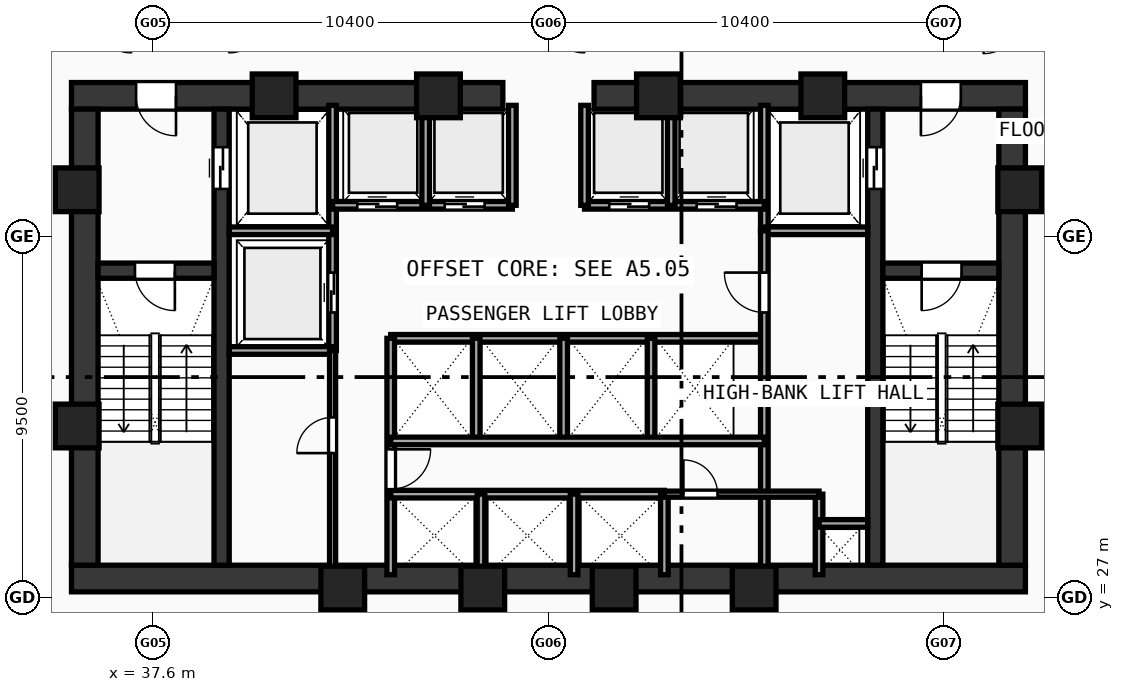
"""IFC4 building model, lengths in metres.
Left out: names, types, materials, properties, quantities, classifications, styles, units other than length and angle.
Written with IfcOpenShell. Run it as: python <this file> out.ifc"""

import sys

from ifc_helpers import new_model, si_unit, direction, frame, frame_2d, origin, origin_with_axes, origin_2d, place, context, subcontext, project, spatial, rectangle, hollow_rectangle, extrude, source, transform, mapped, element, fill, save


model = new_model("IFC4")
c1 = context("Model", 3, precision=1e-05, world=origin(), true_north=direction((0.0, 1.0)))
c2 = subcontext(c1, "Body", "Model", "MODEL_VIEW")
j1 = project(units=[si_unit("LENGTHUNIT", "METRE"), si_unit("PLANEANGLEUNIT", "RADIAN")], contexts=[c1])
p1 = place(None, origin())
s1 = spatial("IfcSite", under=j1, at=p1, CompositionType="ELEMENT")
p2 = place(p1, origin())
s2 = spatial("IfcBuilding", under=s1, at=p2, CompositionType="ELEMENT")
p3 = place(p2, frame((0.0, 0.0, 34.03)))
s3 = spatial("IfcBuildingStorey", under=s2, at=p3, CompositionType="ELEMENT", Elevation=34.03)
p4 = place(p3, frame((35.45, 27.5, 0.0), z_axis=(0.0, 0.0, 1.0), x_axis=(1.0, 0.0, 0.0)))
e1 = element("IfcWall", 1, at=p4, inside=s3, PredefinedType="SHEAR", context=c2, shape_type="SweptSolid", body=[
    extrude(rectangle(XDim=25.1, YDim=0.7, at=frame_2d((12.55, 0.0))), origin(), (0.0, 0.0, 1.0), 3.37),
])
p5 = place(p3, frame((35.45, 40.2, 0.0), z_axis=(0.0, 0.0, 1.0), x_axis=(1.0, 0.0, 0.0)))
e2 = element("IfcWall", 2, at=p5, inside=s3, PredefinedType="SHEAR", context=c2, shape_type="SweptSolid", body=[
    extrude(rectangle(XDim=11.35, YDim=0.7, at=frame_2d((5.675, 0.0))), origin(), (0.0, 0.0, 1.0), 3.37),
])
p6 = place(p5, frame((1.7, 0.0, 0.0)))
e3 = element("IfcOpeningElement", 3, at=p6, cuts=e2, PredefinedType="OPENING", context=c2, shape_type="SweptSolid", body=[
    extrude(rectangle(XDim=1.05, YDim=2.1, at=frame_2d((0.525, 1.05))), frame((0.0, 0.36, 0.0), z_axis=(0.0, -1.0, 0.0), x_axis=(1.0, 0.0, 0.0)), (0.0, 0.0, 1.0), 0.72),
])
p7 = place(p3, frame((49.2, 40.2, 0.0), z_axis=(0.0, 0.0, 1.0), x_axis=(1.0, 0.0, 0.0)))
e4 = element("IfcWall", 4, at=p7, inside=s3, PredefinedType="SHEAR", context=c2, shape_type="SweptSolid", body=[
    extrude(rectangle(XDim=11.35, YDim=0.7, at=frame_2d((5.675, 0.0))), origin(), (0.0, 0.0, 1.0), 3.37),
])
p8 = place(p7, frame((8.6, 0.0, 0.0)))
e5 = element("IfcOpeningElement", 5, at=p8, cuts=e4, PredefinedType="OPENING", context=c2, shape_type="SweptSolid", body=[
    extrude(rectangle(XDim=1.05, YDim=2.1, at=frame_2d((0.525, 1.05))), frame((0.0, 0.36, 0.0), z_axis=(0.0, -1.0, 0.0), x_axis=(1.0, 0.0, 0.0)), (0.0, 0.0, 1.0), 0.72),
])
for number, where, z_axis, x_axis in (
    (6, (35.8, 27.85, 0.0), (0.0, 0.0, 1.0), (0.0, 1.0, 0.0)),
    (7, (60.2, 27.85, 0.0), (0.0, 0.0, 1.0), (0.0, 1.0, 0.0)),
):
    element("IfcWall", number, at=place(p3, frame(where, z_axis=z_axis, x_axis=x_axis)), inside=s3, PredefinedType="SHEAR", context=c2, shape_type="SweptSolid", body=[
        extrude(rectangle(XDim=12.0, YDim=0.7, at=frame_2d((6.0, 0.0))), origin(), (0.0, 0.0, 1.0), 3.37),
    ])
p9 = place(p3, frame((39.4, 27.85, 0.0), z_axis=(0.0, 0.0, 1.0), x_axis=(0.0, 1.0, 0.0)))
e8 = element("IfcWall", 8, at=p9, inside=s3, PredefinedType="SHEAR", context=c2, shape_type="SweptSolid", body=[
    extrude(rectangle(XDim=12.0, YDim=0.4, at=frame_2d((6.0, 0.0))), origin(), (0.0, 0.0, 1.0), 3.37),
])
p10 = place(p9, frame((9.9, 0.0, 0.0)))
e9 = element("IfcOpeningElement", 9, at=p10, cuts=e8, PredefinedType="OPENING", context=c2, shape_type="SweptSolid", body=[
    extrude(rectangle(XDim=1.1, YDim=2.1, at=frame_2d((0.55, 1.05))), frame((0.0, 0.21, 0.0), z_axis=(0.0, -1.0, 0.0), x_axis=(1.0, 0.0, 0.0)), (0.0, 0.0, 1.0), 0.42),
])
p11 = place(p3, frame((56.6, 27.85, 0.0), z_axis=(0.0, 0.0, 1.0), x_axis=(0.0, 1.0, 0.0)))
e10 = element("IfcWall", 10, at=p11, inside=s3, PredefinedType="SHEAR", context=c2, shape_type="SweptSolid", body=[
    extrude(rectangle(XDim=12.0, YDim=0.4, at=frame_2d((6.0, 0.0))), origin(), (0.0, 0.0, 1.0), 3.37),
])
p12 = place(p11, frame((9.9, 0.0, 0.0)))
e11 = element("IfcOpeningElement", 11, at=p12, cuts=e10, PredefinedType="OPENING", context=c2, shape_type="SweptSolid", body=[
    extrude(rectangle(XDim=1.1, YDim=2.1, at=frame_2d((0.55, 1.05))), frame((0.0, 0.21, 0.0), z_axis=(0.0, -1.0, 0.0), x_axis=(1.0, 0.0, 0.0)), (0.0, 0.0, 1.0), 0.42),
])
p13 = place(p3, frame((36.15, 35.6, 0.0), z_axis=(0.0, 0.0, 1.0), x_axis=(1.0, 0.0, 0.0)))
e12 = element("IfcWall", 12, at=p13, inside=s3, PredefinedType="SHEAR", context=c2, shape_type="SweptSolid", body=[
    extrude(rectangle(XDim=3.05, YDim=0.4, at=frame_2d((1.525, 0.0))), origin(), (0.0, 0.0, 1.0), 3.37),
])
p14 = place(p13, frame((0.97, 0.0, 0.0)))
e13 = element("IfcOpeningElement", 13, at=p14, cuts=e12, PredefinedType="OPENING", context=c2, shape_type="SweptSolid", body=[
    extrude(rectangle(XDim=1.05, YDim=2.1, at=frame_2d((0.525, 1.05))), frame((0.0, 0.21, 0.0), z_axis=(0.0, -1.0, 0.0), x_axis=(1.0, 0.0, 0.0)), (0.0, 0.0, 1.0), 0.42),
])
p15 = place(p3, frame((56.8, 35.6, 0.0), z_axis=(0.0, 0.0, 1.0), x_axis=(1.0, 0.0, 0.0)))
e14 = element("IfcWall", 14, at=p15, inside=s3, PredefinedType="SHEAR", context=c2, shape_type="SweptSolid", body=[
    extrude(rectangle(XDim=3.05, YDim=0.4, at=frame_2d((1.525, 0.0))), origin(), (0.0, 0.0, 1.0), 3.37),
])
p16 = place(p15, frame((1.02, 0.0, 0.0)))
e15 = element("IfcOpeningElement", 15, at=p16, cuts=e14, PredefinedType="OPENING", context=c2, shape_type="SweptSolid", body=[
    extrude(rectangle(XDim=1.05, YDim=2.1, at=frame_2d((0.525, 1.05))), frame((0.0, 0.21, 0.0), z_axis=(0.0, -1.0, 0.0), x_axis=(1.0, 0.0, 0.0)), (0.0, 0.0, 1.0), 0.42),
])
m1 = source(origin(), c2, "Body", "SweptSolid", [
    extrude(hollow_rectangle(XDim=1.15, YDim=1.15, WallThickness=0.048, at=origin_2d()), origin(), (0.0, 0.0, 1.0), 3.63),
])
for number, where, z_axis, x_axis in (
    (16, (42.588, 27.25, -0.26), (0.0, 0.0, 1.0), (1.0, 0.0, 0.0)),
    (17, (46.272, 27.25, -0.26), (0.0, 0.0, 1.0), (1.0, 0.0, 0.0)),
    (18, (49.729, 27.25, -0.26), (0.0, 0.0, 1.0), (1.0, 0.0, 0.0)),
    (19, (53.412, 27.25, -0.26), (0.0, 0.0, 1.0), (1.0, 0.0, 0.0)),
    (20, (60.4, 31.513, -0.26), (0.0, 0.0, 1.0), (1.0, 0.0, 0.0)),
    (21, (60.4, 37.729, -0.26), (0.0, 0.0, 1.0), (1.0, 0.0, 0.0)),
    (22, (55.219, 40.2, -0.26), (0.0, 0.0, 1.0), (1.0, 0.0, 0.0)),
    (23, (50.894, 40.2, -0.26), (0.0, 0.0, 1.0), (1.0, 0.0, 0.0)),
    (24, (45.106, 40.2, -0.26), (0.0, 0.0, 1.0), (1.0, 0.0, 0.0)),
    (25, (40.781, 40.2, -0.26), (0.0, 0.0, 1.0), (1.0, 0.0, 0.0)),
    (26, (35.6, 37.729, -0.26), (0.0, 0.0, 1.0), (1.0, 0.0, 0.0)),
    (27, (35.6, 31.513, -0.26), (0.0, 0.0, 1.0), (1.0, 0.0, 0.0)),
):
    element("IfcColumn", number, at=place(p3, frame(where, z_axis=z_axis, x_axis=x_axis)), inside=s3, PredefinedType="COLUMN", context=c2, shape_type="MappedRepresentation", body=[
        mapped(m1, transform((0.0, 0.0, 0.0), scale=1.0)),
    ])
p17 = place(p3, frame((42.32, 33.5, 0.0), z_axis=(0.0, 0.0, 1.0), x_axis=(0.0, 1.0, 0.0)))
e28 = element("IfcWall", 28, at=p17, inside=s3, PredefinedType="SOLIDWALL", context=c2, shape_type="SweptSolid", body=[
    extrude(rectangle(XDim=6.45, YDim=0.2, at=frame_2d((3.225, 0.0))), origin(), (0.0, 0.0, 1.0), 3.37),
])
p18 = place(p17, frame((1.0, 0.0, 0.0)))
e29 = element("IfcOpeningElement", 29, at=p18, cuts=e28, PredefinedType="OPENING", context=c2, shape_type="SweptSolid", body=[
    extrude(rectangle(XDim=1.05, YDim=2.1, at=frame_2d((0.525, 1.05))), frame((0.0, 0.11, 0.0), z_axis=(0.0, -1.0, 0.0), x_axis=(1.0, 0.0, 0.0)), (0.0, 0.0, 1.0), 0.22),
])
for number, where, z_axis, x_axis in (
    (30, (39.6, 36.65, 0.0), (0.0, 0.0, 1.0), (1.0, 0.0, 0.0)),
    (31, (39.6, 33.5, 0.0), (0.0, 0.0, 1.0), (1.0, 0.0, 0.0)),
):
    element("IfcWall", number, at=place(p3, frame(where, z_axis=z_axis, x_axis=x_axis)), inside=s3, PredefinedType="SOLIDWALL", context=c2, shape_type="SweptSolid", body=[
        extrude(rectangle(XDim=2.72, YDim=0.2, at=frame_2d((1.36, 0.0))), origin(), (0.0, 0.0, 1.0), 3.37),
    ])
p19 = place(p3, frame((53.68, 36.65, 0.0), z_axis=(0.0, 0.0, 1.0), x_axis=(0.0, 1.0, 0.0)))
e32 = element("IfcWall", 32, at=p19, inside=s3, PredefinedType="SOLIDWALL", context=c2, shape_type="SweptSolid", body=[
    extrude(rectangle(XDim=3.3, YDim=0.2, at=frame_2d((1.65, 0.0))), origin(), (0.0, 0.0, 1.0), 3.37),
])
p20 = place(p3, frame((53.68, 36.65, 0.0), z_axis=(0.0, 0.0, 1.0), x_axis=(1.0, 0.0, 0.0)))
e33 = element("IfcWall", 33, at=p20, inside=s3, PredefinedType="SOLIDWALL", context=c2, shape_type="SweptSolid", body=[
    extrude(rectangle(XDim=2.72, YDim=0.2, at=frame_2d((1.36, 0.0))), origin(), (0.0, 0.0, 1.0), 3.37),
])
p21 = place(p3, frame((42.32, 37.32, 0.0), z_axis=(0.0, 0.0, 1.0), x_axis=(1.0, 0.0, 0.0)))
e34 = element("IfcWall", 34, at=p21, inside=s3, PredefinedType="SOLIDWALL", context=c2, shape_type="SweptSolid", body=[
    extrude(rectangle(XDim=4.73, YDim=0.2, at=frame_2d((2.365, 0.0))), origin(), (0.0, 0.0, 1.0), 3.37),
])
p22 = place(p21, frame((0.65, 0.0, 0.0)))
e35 = element("IfcOpeningElement", 35, at=p22, cuts=e34, PredefinedType="OPENING", context=c2, shape_type="SweptSolid", body=[
    extrude(rectangle(XDim=1.05, YDim=2.1, at=frame_2d((0.525, 1.05))), frame((0.0, 0.11, 0.0), z_axis=(0.0, -1.0, 0.0), x_axis=(1.0, 0.0, 0.0)), (0.0, 0.0, 1.0), 0.22),
])
p23 = place(p21, frame((2.95, 0.0, 0.0)))
e36 = element("IfcOpeningElement", 36, at=p23, cuts=e34, PredefinedType="OPENING", context=c2, shape_type="SweptSolid", body=[
    extrude(rectangle(XDim=1.05, YDim=2.1, at=frame_2d((0.525, 1.05))), frame((0.0, 0.11, 0.0), z_axis=(0.0, -1.0, 0.0), x_axis=(1.0, 0.0, 0.0)), (0.0, 0.0, 1.0), 0.22),
])
p24 = place(p3, frame((48.95, 37.32, 0.0), z_axis=(0.0, 0.0, 1.0), x_axis=(1.0, 0.0, 0.0)))
e37 = element("IfcWall", 37, at=p24, inside=s3, PredefinedType="SOLIDWALL", context=c2, shape_type="SweptSolid", body=[
    extrude(rectangle(XDim=4.73, YDim=0.2, at=frame_2d((2.365, 0.0))), origin(), (0.0, 0.0, 1.0), 3.37),
])
p25 = place(p24, frame((0.65, 0.0, 0.0)))
e38 = element("IfcOpeningElement", 38, at=p25, cuts=e37, PredefinedType="OPENING", context=c2, shape_type="SweptSolid", body=[
    extrude(rectangle(XDim=1.05, YDim=2.1, at=frame_2d((0.525, 1.05))), frame((0.0, 0.11, 0.0), z_axis=(0.0, -1.0, 0.0), x_axis=(1.0, 0.0, 0.0)), (0.0, 0.0, 1.0), 0.22),
])
p26 = place(p24, frame((2.95, 0.0, 0.0)))
e39 = element("IfcOpeningElement", 39, at=p26, cuts=e37, PredefinedType="OPENING", context=c2, shape_type="SweptSolid", body=[
    extrude(rectangle(XDim=1.05, YDim=2.1, at=frame_2d((0.525, 1.05))), frame((0.0, 0.11, 0.0), z_axis=(0.0, -1.0, 0.0), x_axis=(1.0, 0.0, 0.0)), (0.0, 0.0, 1.0), 0.22),
])
for number, where, z_axis, x_axis in (
    (40, (47.05, 37.32, 0.0), (0.0, 0.0, 1.0), (0.0, 1.0, 0.0)),
    (41, (48.95, 37.32, 0.0), (0.0, 0.0, 1.0), (0.0, 1.0, 0.0)),
    (42, (44.77, 37.32, 0.0), (0.0, 0.0, 1.0), (0.0, 1.0, 0.0)),
    (43, (51.23, 37.32, 0.0), (0.0, 0.0, 1.0), (0.0, 1.0, 0.0)),
):
    element("IfcWall", number, at=place(p3, frame(where, z_axis=z_axis, x_axis=x_axis)), inside=s3, PredefinedType="SOLIDWALL", context=c2, shape_type="SweptSolid", body=[
        extrude(rectangle(XDim=2.63, YDim=0.2, at=frame_2d((1.315, 0.0))), origin(), (0.0, 0.0, 1.0), 3.37),
    ])
p27 = place(p3, frame((43.85, 33.82, 0.0), z_axis=(0.0, 0.0, 1.0), x_axis=(1.0, 0.0, 0.0)))
e44 = element("IfcWall", 44, at=p27, inside=s3, PredefinedType="SOLIDWALL", context=c2, shape_type="SweptSolid", body=[
    extrude(rectangle(XDim=9.83, YDim=0.2, at=frame_2d((4.915, 0.0))), origin(), (0.0, 0.0, 1.0), 3.37),
])
p28 = place(p3, frame((43.85, 27.6, 0.0), z_axis=(0.0, 0.0, 1.0), x_axis=(0.0, 1.0, 0.0)))
e45 = element("IfcWall", 45, at=p28, inside=s3, PredefinedType="SOLIDWALL", context=c2, shape_type="SweptSolid", body=[
    extrude(rectangle(XDim=6.22, YDim=0.2, at=frame_2d((3.11, 0.0))), origin(), (0.0, 0.0, 1.0), 3.37),
])
p29 = place(p28, frame((2.25, 0.0, 0.0)))
e46 = element("IfcOpeningElement", 46, at=p29, cuts=e45, PredefinedType="OPENING", context=c2, shape_type="SweptSolid", body=[
    extrude(rectangle(XDim=1.05, YDim=2.1, at=frame_2d((0.525, 1.05))), frame((0.0, 0.11, 0.0), z_axis=(0.0, -1.0, 0.0), x_axis=(1.0, 0.0, 0.0)), (0.0, 0.0, 1.0), 0.22),
])
p30 = place(p3, frame((53.68, 27.6, 0.0), z_axis=(0.0, 0.0, 1.0), x_axis=(0.0, 1.0, 0.0)))
e47 = element("IfcWall", 47, at=p30, inside=s3, PredefinedType="SOLIDWALL", context=c2, shape_type="SweptSolid", body=[
    extrude(rectangle(XDim=9.05, YDim=0.2, at=frame_2d((4.525, 0.0))), origin(), (0.0, 0.0, 1.0), 3.37),
])
p31 = place(p30, frame((6.9, 0.0, 0.0)))
e48 = element("IfcOpeningElement", 48, at=p31, cuts=e47, PredefinedType="OPENING", context=c2, shape_type="SweptSolid", body=[
    extrude(rectangle(XDim=1.05, YDim=2.1, at=frame_2d((0.525, 1.05))), frame((0.0, 0.11, 0.0), z_axis=(0.0, -1.0, 0.0), x_axis=(1.0, 0.0, 0.0)), (0.0, 0.0, 1.0), 0.22),
])
for number, where, z_axis, x_axis in (
    (49, (46.1, 31.12, 0.0), (0.0, 0.0, 1.0), (0.0, 1.0, 0.0)),
    (50, (48.4, 31.12, 0.0), (0.0, 0.0, 1.0), (0.0, 1.0, 0.0)),
    (51, (50.7, 31.12, 0.0), (0.0, 0.0, 1.0), (0.0, 1.0, 0.0)),
):
    element("IfcWall", number, at=place(p3, frame(where, z_axis=z_axis, x_axis=x_axis)), inside=s3, PredefinedType="SOLIDWALL", context=c2, shape_type="SweptSolid", body=[
        extrude(rectangle(XDim=2.7, YDim=0.2, at=frame_2d((1.35, 0.0))), origin(), (0.0, 0.0, 1.0), 3.37),
    ])
p32 = place(p3, frame((43.85, 29.72, 0.0), z_axis=(0.0, 0.0, 1.0), x_axis=(1.0, 0.0, 0.0)))
e52 = element("IfcWall", 52, at=p32, inside=s3, PredefinedType="SOLIDWALL", context=c2, shape_type="SweptSolid", body=[
    extrude(rectangle(XDim=7.2, YDim=0.2, at=frame_2d((3.6, 0.0))), origin(), (0.0, 0.0, 1.0), 3.37),
])
p33 = place(p3, frame((51.05, 27.6, 0.0), z_axis=(0.0, 0.0, 1.0), x_axis=(0.0, 1.0, 0.0)))
e53 = element("IfcWall", 53, at=p33, inside=s3, PredefinedType="SOLIDWALL", context=c2, shape_type="SweptSolid", body=[
    extrude(rectangle(XDim=2.12, YDim=0.2, at=frame_2d((1.06, 0.0))), origin(), (0.0, 0.0, 1.0), 3.37),
])
p34 = place(p3, frame((43.85, 31.12, 0.0), z_axis=(0.0, 0.0, 1.0), x_axis=(1.0, 0.0, 0.0)))
e54 = element("IfcWall", 54, at=p34, inside=s3, PredefinedType="SOLIDWALL", context=c2, shape_type="SweptSolid", body=[
    extrude(rectangle(XDim=9.83, YDim=0.2, at=frame_2d((4.915, 0.0))), origin(), (0.0, 0.0, 1.0), 3.37),
])
for number, where, z_axis, x_axis in (
    (55, (46.225, 27.6, 0.0), (0.0, 0.0, 1.0), (0.0, 1.0, 0.0)),
    (56, (48.675, 27.6, 0.0), (0.0, 0.0, 1.0), (0.0, 1.0, 0.0)),
    (57, (55.12, 27.6, 0.0), (0.0, 0.0, 1.0), (0.0, 1.0, 0.0)),
):
    element("IfcWall", number, at=place(p3, frame(where, z_axis=z_axis, x_axis=x_axis)), inside=s3, PredefinedType="SOLIDWALL", context=c2, shape_type="SweptSolid", body=[
        extrude(rectangle(XDim=2.12, YDim=0.2, at=frame_2d((1.06, 0.0))), origin(), (0.0, 0.0, 1.0), 3.37),
    ])
p35 = place(p3, frame((55.12, 28.95, 0.0), z_axis=(0.0, 0.0, 1.0), x_axis=(1.0, 0.0, 0.0)))
e58 = element("IfcWall", 58, at=p35, inside=s3, PredefinedType="SOLIDWALL", context=c2, shape_type="SweptSolid", body=[
    extrude(rectangle(XDim=1.28, YDim=0.2, at=frame_2d((0.64, 0.0))), origin(), (0.0, 0.0, 1.0), 3.37),
])
p36 = place(p3, frame((42.32, 27.6, 0.0), z_axis=(0.0, 0.0, 1.0), x_axis=(0.0, 1.0, 0.0)))
e59 = element("IfcWall", 59, at=p36, inside=s3, PredefinedType="PARTITIONING", context=c2, shape_type="SweptSolid", body=[
    extrude(rectangle(XDim=5.9, YDim=0.16, at=frame_2d((2.95, 0.0))), origin(), (0.0, 0.0, 1.0), 3.37),
])
p37 = place(p36, frame((3.2, 0.0, 0.0)))
e60 = element("IfcOpeningElement", 60, at=p37, cuts=e59, PredefinedType="OPENING", context=c2, shape_type="SweptSolid", body=[
    extrude(rectangle(XDim=0.94, YDim=2.1, at=frame_2d((0.47, 1.05))), frame((0.0, 0.09, 0.0), z_axis=(0.0, -1.0, 0.0), x_axis=(1.0, 0.0, 0.0)), (0.0, 0.0, 1.0), 0.18),
])
p38 = place(p3, frame((51.05, 29.72, 0.0), z_axis=(0.0, 0.0, 1.0), x_axis=(1.0, 0.0, 0.0)))
e61 = element("IfcWall", 61, at=p38, inside=s3, PredefinedType="PARTITIONING", context=c2, shape_type="SweptSolid", body=[
    extrude(rectangle(XDim=4.07, YDim=0.16, at=frame_2d((2.035, 0.0))), origin(), (0.0, 0.0, 1.0), 3.37),
])
p39 = place(p38, frame((0.5, 0.0, 0.0)))
e62 = element("IfcOpeningElement", 62, at=p39, cuts=e61, PredefinedType="OPENING", context=c2, shape_type="SweptSolid", body=[
    extrude(rectangle(XDim=0.9, YDim=2.1, at=frame_2d((0.45, 1.05))), frame((0.0, 0.09, 0.0), z_axis=(0.0, -1.0, 0.0), x_axis=(1.0, 0.0, 0.0)), (0.0, 0.0, 1.0), 0.18),
])
m2 = source(origin(), c2, "Body", "SweptSolid", [
    extrude(rectangle(XDim=1.05, YDim=2.1, at=frame_2d((0.525, 1.05))), frame((0.0, 0.025, 0.0), z_axis=(0.0, -1.0, 0.0), x_axis=(1.0, 0.0, 0.0)), (0.0, 0.0, 1.0), 0.05),
])
p40 = place(p14, frame((1.05, 0.0, 0.0), z_axis=(0.0, 0.0, 1.0), x_axis=(-1.0, 0.0, 0.0)))
e63 = element("IfcDoor", 63, at=p40, inside=s3, OperationType="SINGLE_SWING_LEFT", PredefinedType="DOOR", context=c2, shape_type="MappedRepresentation", body=[
    mapped(m2, transform((0.0, 0.0, 0.0), scale=1.0)),
])
fill(e13, e63)
p41 = place(p16, frame((1.05, 0.0, 0.0), z_axis=(0.0, 0.0, 1.0), x_axis=(-1.0, 0.0, 0.0)))
e64 = element("IfcDoor", 64, at=p41, inside=s3, OperationType="SINGLE_SWING_RIGHT", PredefinedType="DOOR", context=c2, shape_type="MappedRepresentation", body=[
    mapped(m2, transform((0.0, 0.0, 0.0), scale=1.0)),
])
fill(e15, e64)
p42 = place(p6, frame((1.05, 0.0, 0.0), z_axis=(0.0, 0.0, 1.0), x_axis=(-1.0, 0.0, 0.0)))
e65 = element("IfcDoor", 65, at=p42, inside=s3, OperationType="SINGLE_SWING_LEFT", PredefinedType="DOOR", context=c2, shape_type="MappedRepresentation", body=[
    mapped(m2, transform((0.0, 0.0, 0.0), scale=1.0)),
])
fill(e3, e65)
p43 = place(p8, frame((1.05, 0.0, 0.0), z_axis=(0.0, 0.0, 1.0), x_axis=(-1.0, 0.0, 0.0)))
e66 = element("IfcDoor", 66, at=p43, inside=s3, OperationType="SINGLE_SWING_RIGHT", PredefinedType="DOOR", context=c2, shape_type="MappedRepresentation", body=[
    mapped(m2, transform((0.0, 0.0, 0.0), scale=1.0)),
])
fill(e5, e66)
m3 = source(origin(), c2, "Body", "SweptSolid", [
    extrude(rectangle(XDim=1.1, YDim=2.1, at=frame_2d((0.55, 1.05))), frame((0.0, 0.025, 0.0), z_axis=(0.0, -1.0, 0.0), x_axis=(1.0, 0.0, 0.0)), (0.0, 0.0, 1.0), 0.05),
])
p44 = place(p10, frame((1.1, 0.0, 0.0), z_axis=(0.0, 0.0, 1.0), x_axis=(-1.0, 0.0, 0.0)))
e67 = element("IfcDoor", 67, at=p44, inside=s3, OperationType="DOUBLE_DOOR_SLIDING", PredefinedType="DOOR", context=c2, shape_type="MappedRepresentation", body=[
    mapped(m3, transform((0.0, 0.0, 0.0), scale=1.0)),
])
fill(e9, e67)
p45 = place(p12, origin_with_axes())
e68 = element("IfcDoor", 68, at=p45, inside=s3, OperationType="DOUBLE_DOOR_SLIDING", PredefinedType="DOOR", context=c2, shape_type="MappedRepresentation", body=[
    mapped(m3, transform((0.0, 0.0, 0.0), scale=1.0)),
])
fill(e11, e68)
p46 = place(p18, origin_with_axes())
e69 = element("IfcDoor", 69, at=p46, inside=s3, OperationType="DOUBLE_DOOR_SLIDING", PredefinedType="DOOR", context=c2, shape_type="MappedRepresentation", body=[
    mapped(m2, transform((0.0, 0.0, 0.0), scale=1.0)),
])
fill(e29, e69)
p47 = place(p22, frame((1.05, 0.0, 0.0), z_axis=(0.0, 0.0, 1.0), x_axis=(-1.0, 0.0, 0.0)))
e70 = element("IfcDoor", 70, at=p47, inside=s3, OperationType="DOUBLE_DOOR_SLIDING", PredefinedType="DOOR", context=c2, shape_type="MappedRepresentation", body=[
    mapped(m2, transform((0.0, 0.0, 0.0), scale=1.0)),
])
fill(e35, e70)
p48 = place(p23, frame((1.05, 0.0, 0.0), z_axis=(0.0, 0.0, 1.0), x_axis=(-1.0, 0.0, 0.0)))
e71 = element("IfcDoor", 71, at=p48, inside=s3, OperationType="DOUBLE_DOOR_SLIDING", PredefinedType="DOOR", context=c2, shape_type="MappedRepresentation", body=[
    mapped(m2, transform((0.0, 0.0, 0.0), scale=1.0)),
])
fill(e36, e71)
p49 = place(p25, frame((1.05, 0.0, 0.0), z_axis=(0.0, 0.0, 1.0), x_axis=(-1.0, 0.0, 0.0)))
e72 = element("IfcDoor", 72, at=p49, inside=s3, OperationType="DOUBLE_DOOR_SLIDING", PredefinedType="DOOR", context=c2, shape_type="MappedRepresentation", body=[
    mapped(m2, transform((0.0, 0.0, 0.0), scale=1.0)),
])
fill(e38, e72)
p50 = place(p26, frame((1.05, 0.0, 0.0), z_axis=(0.0, 0.0, 1.0), x_axis=(-1.0, 0.0, 0.0)))
e73 = element("IfcDoor", 73, at=p50, inside=s3, OperationType="DOUBLE_DOOR_SLIDING", PredefinedType="DOOR", context=c2, shape_type="MappedRepresentation", body=[
    mapped(m2, transform((0.0, 0.0, 0.0), scale=1.0)),
])
fill(e39, e73)
p51 = place(p29, frame((1.05, 0.0, 0.0), z_axis=(0.0, 0.0, 1.0), x_axis=(-1.0, 0.0, 0.0)))
e74 = element("IfcDoor", 74, at=p51, inside=s3, OperationType="SINGLE_SWING_LEFT", PredefinedType="DOOR", context=c2, shape_type="MappedRepresentation", body=[
    mapped(m2, transform((0.0, 0.0, 0.0), scale=1.0)),
])
fill(e46, e74)
p52 = place(p31, origin_with_axes())
e75 = element("IfcDoor", 75, at=p52, inside=s3, OperationType="SINGLE_SWING_RIGHT", PredefinedType="DOOR", context=c2, shape_type="MappedRepresentation", body=[
    mapped(m2, transform((0.0, 0.0, 0.0), scale=1.0)),
])
fill(e48, e75)
m4 = source(origin(), c2, "Body", "SweptSolid", [
    extrude(rectangle(XDim=0.94, YDim=2.1, at=frame_2d((0.47, 1.05))), frame((0.0, 0.025, 0.0), z_axis=(0.0, -1.0, 0.0), x_axis=(1.0, 0.0, 0.0)), (0.0, 0.0, 1.0), 0.05),
])
p53 = place(p37, origin_with_axes())
e76 = element("IfcDoor", 76, at=p53, inside=s3, OperationType="SINGLE_SWING_LEFT", PredefinedType="DOOR", context=c2, shape_type="MappedRepresentation", body=[
    mapped(m4, transform((0.0, 0.0, 0.0), scale=1.0)),
])
fill(e60, e76)
m5 = source(origin(), c2, "Body", "SweptSolid", [
    extrude(rectangle(XDim=0.9, YDim=2.1, at=frame_2d((0.45, 1.05))), frame((0.0, 0.025, 0.0), z_axis=(0.0, -1.0, 0.0), x_axis=(1.0, 0.0, 0.0)), (0.0, 0.0, 1.0), 0.05),
])
p54 = place(p39, origin_with_axes())
e77 = element("IfcDoor", 77, at=p54, inside=s3, OperationType="SINGLE_SWING_LEFT", PredefinedType="DOOR", context=c2, shape_type="MappedRepresentation", body=[
    mapped(m5, transform((0.0, 0.0, 0.0), scale=1.0)),
])
fill(e62, e77)
save(model, sys.argv[1])
